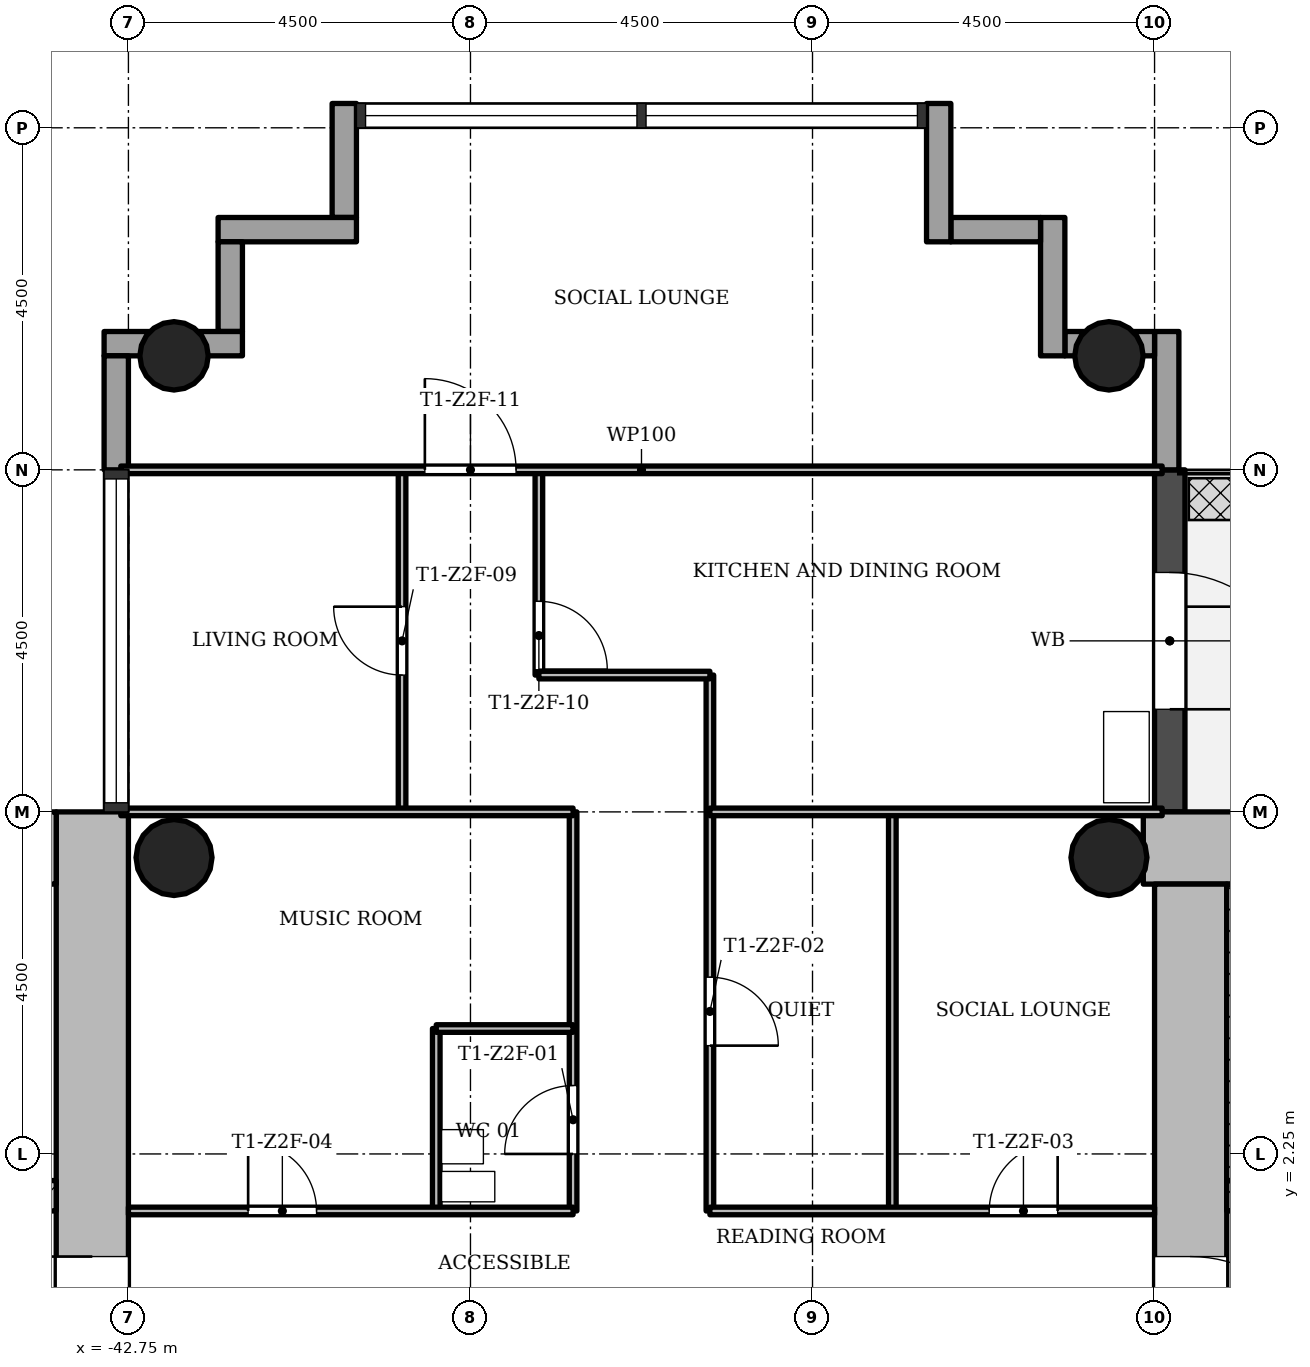
"""IFC4 building model, lengths in metres.
Left out: names, types, materials, properties, quantities, classifications, styles, units other than length and angle.
Written with IfcOpenShell. Run it as: python <this file> out.ifc"""

import sys

from ifc_helpers import new_model, si_unit, direction, frame, frame_2d, origin, origin_2d, place, context, subcontext, project, spatial, rectangle, hollow_circle, extrude, element, fill, save


model = new_model("IFC4")
c1 = context("Model", 3, precision=1e-05, world=origin(), true_north=direction((0.0, 1.0)))
c2 = subcontext(c1, "Body", "Model", "MODEL_VIEW")
j1 = project(units=[si_unit("LENGTHUNIT", "METRE"), si_unit("PLANEANGLEUNIT", "RADIAN")], contexts=[c1])
p1 = place(None, origin())
s1 = spatial("IfcSite", under=j1, at=p1, CompositionType="ELEMENT")
p2 = place(p1, origin())
s2 = spatial("IfcBuilding", under=s1, at=p2, CompositionType="ELEMENT")
p3 = place(p2, frame((0.0, 0.0, 110.6)))
s3 = spatial("IfcBuildingStorey", under=s2, at=p3, CompositionType="ELEMENT", Elevation=110.6)
p4 = place(p3, frame((-20.702, 6.275, 0.0), z_axis=(0.0, 0.0, 1.0), x_axis=(-1.0, 0.0, 0.0)))
e1 = element("IfcWall", 1, at=p4, inside=s3, PredefinedType="SHEAR", context=c2, shape_type="SweptSolid", body=[
    extrude(rectangle(XDim=8.696, YDim=0.95, at=frame_2d((4.348, 0.0))), origin(), (0.0, 0.0, 1.0), 3.4),
])
p5 = place(p3, frame((-28.775, 5.8, 0.0), z_axis=(0.0, 0.0, 1.0), x_axis=(0.0, -1.0, 0.0)))
e2 = element("IfcWall", 2, at=p5, inside=s3, PredefinedType="SHEAR", context=c2, shape_type="SweptSolid", body=[
    extrude(rectangle(XDim=12.55, YDim=0.95, at=frame_2d((6.275, 0.0))), origin(), (0.0, 0.0, 1.0), 3.4),
])
p6 = place(p5, frame((4.9, 0.0, 0.0)))
e3 = element("IfcOpeningElement", 3, at=p6, cuts=e2, PredefinedType="OPENING", context=c2, shape_type="SweptSolid", body=[
    extrude(rectangle(XDim=1.8, YDim=2.1, at=frame_2d((0.9, 1.05))), frame((0.0, 0.485, 0.0), z_axis=(0.0, -1.0, 0.0), x_axis=(1.0, 0.0, 0.0)), (0.0, 0.0, 1.0), 0.97),
])
p7 = place(p3, frame((-28.3, 1.7, 0.0), z_axis=(0.0, 0.0, 1.0), x_axis=(1.0, 0.0, 0.0)))
e4 = element("IfcWall", 4, at=p7, inside=s3, PredefinedType="SHEAR", context=c2, shape_type="SweptSolid", body=[
    extrude(rectangle(XDim=7.1, YDim=0.4, at=frame_2d((3.55, 0.0))), origin(), (0.0, 0.0, 1.0), 3.4),
])
p8 = place(p7, frame((0.7, 0.0, 0.0)))
e5 = element("IfcOpeningElement", 5, at=p8, cuts=e4, PredefinedType="OPENING", context=c2, shape_type="SweptSolid", body=[
    extrude(rectangle(XDim=0.9, YDim=2.1, at=frame_2d((0.45, 1.05))), frame((0.0, 0.21, 0.0), z_axis=(0.0, -1.0, 0.0), x_axis=(1.0, 0.0, 0.0)), (0.0, 0.0, 1.0), 0.42),
])
p9 = place(p3, frame((-43.225, -5.8, 0.0), z_axis=(0.0, 0.0, 1.0), x_axis=(0.0, 1.0, 0.0)))
e6 = element("IfcWall", 6, at=p9, inside=s3, PredefinedType="SHEAR", context=c2, shape_type="SweptSolid", body=[
    extrude(rectangle(XDim=12.55, YDim=0.95, at=frame_2d((6.275, 0.0))), origin(), (0.0, 0.0, 1.0), 3.4),
])
p10 = place(p9, frame((4.9, 0.0, 0.0)))
e7 = element("IfcOpeningElement", 7, at=p10, cuts=e6, PredefinedType="OPENING", context=c2, shape_type="SweptSolid", body=[
    extrude(rectangle(XDim=1.8, YDim=2.1, at=frame_2d((0.9, 1.05))), frame((0.0, 0.485, 0.0), z_axis=(0.0, -1.0, 0.0), x_axis=(1.0, 0.0, 0.0)), (0.0, 0.0, 1.0), 0.97),
])
p11 = place(p3, frame((-43.7, 6.275, 0.0), z_axis=(0.0, 0.0, 1.0), x_axis=(-1.0, 0.0, 0.0)))
e8 = element("IfcWall", 8, at=p11, inside=s3, PredefinedType="SHEAR", context=c2, shape_type="SweptSolid", body=[
    extrude(rectangle(XDim=8.05, YDim=0.95, at=frame_2d((4.025, 0.0))), origin(), (0.0, 0.0, 1.0), 3.4),
])
p12 = place(p3, frame((-50.8, 1.7, 0.0), z_axis=(0.0, 0.0, 1.0), x_axis=(1.0, 0.0, 0.0)))
e9 = element("IfcWall", 9, at=p12, inside=s3, PredefinedType="SHEAR", context=c2, shape_type="SweptSolid", body=[
    extrude(rectangle(XDim=7.1, YDim=0.4, at=frame_2d((3.55, 0.0))), origin(), (0.0, 0.0, 1.0), 3.4),
])
p13 = place(p12, frame((5.2, 0.0, 0.0)))
e10 = element("IfcOpeningElement", 10, at=p13, cuts=e9, PredefinedType="OPENING", context=c2, shape_type="SweptSolid", body=[
    extrude(rectangle(XDim=1.1, YDim=2.1, at=frame_2d((0.55, 1.05))), frame((0.0, 0.21, 0.0), z_axis=(0.0, -1.0, 0.0), x_axis=(1.0, 0.0, 0.0)), (0.0, 0.0, 1.0), 0.42),
])
for number, where, z_axis, x_axis in (
    (11, (-29.85, 12.75, 0.0), (0.0, 0.0, 1.0), (1.0, 0.0, 0.0)),
    (12, (-42.15, 12.75, 0.0), (0.0, 0.0, 1.0), (1.0, 0.0, 0.0)),
):
    element("IfcColumn", number, at=place(p3, frame(where, z_axis=z_axis, x_axis=x_axis)), inside=s3, PredefinedType="COLUMN", context=c2, shape_type="SweptSolid", body=[
        extrude(hollow_circle(Radius=0.45, WallThickness=0.032, at=origin_2d()), origin(), (0.0, 0.0, 1.0), 3.4),
    ])
for number, where, z_axis, x_axis in (
    (13, (-29.85, 6.15, 0.0), (0.0, 0.0, 1.0), (1.0, 0.0, 0.0)),
    (14, (-42.15, 6.15, 0.0), (0.0, 0.0, 1.0), (1.0, 0.0, 0.0)),
):
    element("IfcColumn", number, at=place(p3, frame(where, z_axis=z_axis, x_axis=x_axis)), inside=s3, PredefinedType="COLUMN", context=c2, shape_type="SweptSolid", body=[
        extrude(hollow_circle(Radius=0.5, WallThickness=0.036, at=origin_2d()), origin(), (0.0, 0.0, 1.0), 3.4),
    ])
p14 = place(p3, frame((-29.05, 6.75, -0.02), z_axis=(0.0, 0.0, 1.0), x_axis=(0.0, 1.0, 0.0)))
e15 = element("IfcWall", 15, at=p14, inside=s3, PredefinedType="STANDARD", context=c2, shape_type="SweptSolid", body=[
    extrude(rectangle(XDim=4.5, YDim=0.4, at=frame_2d((2.25, 0.0))), origin(), (0.0, 0.0, 1.0), 3.12),
])
p15 = place(p14, frame((1.35, 0.0, 0.02)))
e16 = element("IfcOpeningElement", 16, at=p15, cuts=e15, PredefinedType="OPENING", context=c2, shape_type="SweptSolid", body=[
    extrude(rectangle(XDim=1.8, YDim=2.1, at=frame_2d((0.9, 1.05))), frame((0.0, 0.21, 0.0), z_axis=(0.0, -1.0, 0.0), x_axis=(1.0, 0.0, 0.0)), (0.0, 0.0, 1.0), 0.42),
])
p16 = place(p3, frame((-29.09, 11.25, -0.3), z_axis=(0.0, 0.0, 1.0), x_axis=(0.0, 1.0, 0.0)))
e17 = element("IfcWall", 17, at=p16, inside=s3, PredefinedType="STANDARD", context=c2, shape_type="SweptSolid", body=[
    extrude(rectangle(XDim=1.82, YDim=0.32, at=frame_2d((0.91, 0.0))), origin(), (0.0, 0.0, 1.0), 3.4),
])
p17 = place(p3, frame((-29.25, 12.91, -0.3), z_axis=(0.0, 0.0, 1.0), x_axis=(-1.0, 0.0, 0.0)))
e18 = element("IfcWall", 18, at=p17, inside=s3, PredefinedType="STANDARD", context=c2, shape_type="SweptSolid", body=[
    extrude(rectangle(XDim=1.18, YDim=0.32, at=frame_2d((0.59, 0.0))), origin(), (0.0, 0.0, 1.0), 3.4),
])
p18 = place(p3, frame((-30.59, 12.75, -0.3), z_axis=(0.0, 0.0, 1.0), x_axis=(0.0, 1.0, 0.0)))
e19 = element("IfcWall", 19, at=p18, inside=s3, PredefinedType="STANDARD", context=c2, shape_type="SweptSolid", body=[
    extrude(rectangle(XDim=1.82, YDim=0.32, at=frame_2d((0.91, 0.0))), origin(), (0.0, 0.0, 1.0), 3.4),
])
p19 = place(p3, frame((-30.75, 14.41, -0.3), z_axis=(0.0, 0.0, 1.0), x_axis=(-1.0, 0.0, 0.0)))
e20 = element("IfcWall", 20, at=p19, inside=s3, PredefinedType="STANDARD", context=c2, shape_type="SweptSolid", body=[
    extrude(rectangle(XDim=1.18, YDim=0.32, at=frame_2d((0.59, 0.0))), origin(), (0.0, 0.0, 1.0), 3.4),
])
p20 = place(p3, frame((-32.09, 14.25, -0.3), z_axis=(0.0, 0.0, 1.0), x_axis=(0.0, 1.0, 0.0)))
e21 = element("IfcWall", 21, at=p20, inside=s3, PredefinedType="STANDARD", context=c2, shape_type="SweptSolid", body=[
    extrude(rectangle(XDim=1.82, YDim=0.32, at=frame_2d((0.91, 0.0))), origin(), (0.0, 0.0, 1.0), 3.4),
])
p21 = place(p3, frame((-39.91, 16.07, -0.3), z_axis=(0.0, 0.0, 1.0), x_axis=(0.0, -1.0, 0.0)))
e22 = element("IfcWall", 22, at=p21, inside=s3, PredefinedType="STANDARD", context=c2, shape_type="SweptSolid", body=[
    extrude(rectangle(XDim=1.5, YDim=0.32, at=frame_2d((0.75, 0.0))), origin(), (0.0, 0.0, 1.0), 3.4),
])
p22 = place(p3, frame((-39.75, 14.41, -0.3), z_axis=(0.0, 0.0, 1.0), x_axis=(-1.0, 0.0, 0.0)))
e23 = element("IfcWall", 23, at=p22, inside=s3, PredefinedType="STANDARD", context=c2, shape_type="SweptSolid", body=[
    extrude(rectangle(XDim=1.82, YDim=0.32, at=frame_2d((0.91, 0.0))), origin(), (0.0, 0.0, 1.0), 3.4),
])
p23 = place(p3, frame((-41.41, 14.25, -0.3), z_axis=(0.0, 0.0, 1.0), x_axis=(0.0, -1.0, 0.0)))
e24 = element("IfcWall", 24, at=p23, inside=s3, PredefinedType="STANDARD", context=c2, shape_type="SweptSolid", body=[
    extrude(rectangle(XDim=1.18, YDim=0.32, at=frame_2d((0.59, 0.0))), origin(), (0.0, 0.0, 1.0), 3.4),
])
p24 = place(p3, frame((-41.25, 12.91, -0.3), z_axis=(0.0, 0.0, 1.0), x_axis=(-1.0, 0.0, 0.0)))
e25 = element("IfcWall", 25, at=p24, inside=s3, PredefinedType="STANDARD", context=c2, shape_type="SweptSolid", body=[
    extrude(rectangle(XDim=1.82, YDim=0.32, at=frame_2d((0.91, 0.0))), origin(), (0.0, 0.0, 1.0), 3.4),
])
p25 = place(p3, frame((-42.91, 12.75, -0.3), z_axis=(0.0, 0.0, 1.0), x_axis=(0.0, -1.0, 0.0)))
e26 = element("IfcWall", 26, at=p25, inside=s3, PredefinedType="STANDARD", context=c2, shape_type="SweptSolid", body=[
    extrude(rectangle(XDim=1.5, YDim=0.32, at=frame_2d((0.75, 0.0))), origin(), (0.0, 0.0, 1.0), 3.4),
])
p26 = place(p3, frame((-39.15, 6.75, 0.0), z_axis=(0.0, 0.0, 1.0), x_axis=(0.0, 1.0, 0.0)))
e27 = element("IfcWall", 27, at=p26, inside=s3, PredefinedType="PARTITIONING", context=c2, shape_type="SweptSolid", body=[
    extrude(rectangle(XDim=4.5, YDim=0.1, at=frame_2d((2.25, 0.0))), origin(), (0.0, 0.0, 1.0), 3.0),
])
p27 = place(p26, frame((1.8, 0.0, 0.0)))
e28 = element("IfcOpeningElement", 28, at=p27, cuts=e27, PredefinedType="OPENING", context=c2, shape_type="SweptSolid", body=[
    extrude(rectangle(XDim=0.9, YDim=2.1, at=frame_2d((0.45, 1.05))), frame((0.0, 0.06, 0.0), z_axis=(0.0, -1.0, 0.0), x_axis=(1.0, 0.0, 0.0)), (0.0, 0.0, 1.0), 0.12),
])
p28 = place(p3, frame((-38.7, 1.5, 0.0), z_axis=(0.0, 0.0, 1.0), x_axis=(0.0, 1.0, 0.0)))
e29 = element("IfcWall", 29, at=p28, inside=s3, PredefinedType="PARTITIONING", context=c2, shape_type="SweptSolid", body=[
    extrude(rectangle(XDim=2.4, YDim=0.1, at=frame_2d((1.2, 0.0))), origin(), (0.0, 0.0, 1.0), 3.0),
])
p29 = place(p3, frame((-37.35, 8.55, 0.0), z_axis=(0.0, 0.0, 1.0), x_axis=(0.0, 1.0, 0.0)))
e30 = element("IfcWall", 30, at=p29, inside=s3, PredefinedType="PARTITIONING", context=c2, shape_type="SweptSolid", body=[
    extrude(rectangle(XDim=2.7, YDim=0.1, at=frame_2d((1.35, 0.0))), origin(), (0.0, 0.0, 1.0), 3.0),
])
p30 = place(p29, frame((0.07, 0.0, 0.0)))
e31 = element("IfcOpeningElement", 31, at=p30, cuts=e30, PredefinedType="OPENING", context=c2, shape_type="SweptSolid", body=[
    extrude(rectangle(XDim=0.9, YDim=2.1, at=frame_2d((0.45, 1.05))), frame((0.0, 0.06, 0.0), z_axis=(0.0, -1.0, 0.0), x_axis=(1.0, 0.0, 0.0)), (0.0, 0.0, 1.0), 0.12),
])
p31 = place(p3, frame((-36.9, 1.5, 0.0), z_axis=(0.0, 0.0, 1.0), x_axis=(0.0, 1.0, 0.0)))
e32 = element("IfcWall", 32, at=p31, inside=s3, PredefinedType="PARTITIONING", context=c2, shape_type="SweptSolid", body=[
    extrude(rectangle(XDim=5.25, YDim=0.1, at=frame_2d((2.625, 0.0))), origin(), (0.0, 0.0, 1.0), 3.0),
])
p32 = place(p31, frame((0.75, 0.0, 0.0)))
e33 = element("IfcOpeningElement", 33, at=p32, cuts=e32, PredefinedType="OPENING", context=c2, shape_type="SweptSolid", body=[
    extrude(rectangle(XDim=0.9, YDim=2.1, at=frame_2d((0.45, 1.05))), frame((0.0, 0.06, 0.0), z_axis=(0.0, -1.0, 0.0), x_axis=(1.0, 0.0, 0.0)), (0.0, 0.0, 1.0), 0.12),
])
p33 = place(p3, frame((-35.1, 1.5, 0.0), z_axis=(0.0, 0.0, 1.0), x_axis=(0.0, 1.0, 0.0)))
e34 = element("IfcWall", 34, at=p33, inside=s3, PredefinedType="PARTITIONING", context=c2, shape_type="SweptSolid", body=[
    extrude(rectangle(XDim=7.05, YDim=0.1, at=frame_2d((3.525, 0.0))), origin(), (0.0, 0.0, 1.0), 3.0),
])
p34 = place(p33, frame((2.175, 0.0, 0.0)))
e35 = element("IfcOpeningElement", 35, at=p34, cuts=e34, PredefinedType="OPENING", context=c2, shape_type="SweptSolid", body=[
    extrude(rectangle(XDim=0.9, YDim=2.1, at=frame_2d((0.45, 1.05))), frame((0.0, 0.06, 0.0), z_axis=(0.0, -1.0, 0.0), x_axis=(1.0, 0.0, 0.0)), (0.0, 0.0, 1.0), 0.12),
])
p35 = place(p3, frame((-32.7, 1.5, 0.0), z_axis=(0.0, 0.0, 1.0), x_axis=(0.0, 1.0, 0.0)))
e36 = element("IfcWall", 36, at=p35, inside=s3, PredefinedType="PARTITIONING", context=c2, shape_type="SweptSolid", body=[
    extrude(rectangle(XDim=5.25, YDim=0.1, at=frame_2d((2.625, 0.0))), origin(), (0.0, 0.0, 1.0), 3.0),
])
p36 = place(p3, frame((-42.75, 1.5, 0.0), z_axis=(0.0, 0.0, 1.0), x_axis=(1.0, 0.0, 0.0)))
e37 = element("IfcWall", 37, at=p36, inside=s3, PredefinedType="PARTITIONING", context=c2, shape_type="SweptSolid", body=[
    extrude(rectangle(XDim=5.85, YDim=0.1, at=frame_2d((2.925, 0.0))), origin(), (0.0, 0.0, 1.0), 3.0),
])
p37 = place(p36, frame((1.575, 0.0, 0.0)))
e38 = element("IfcOpeningElement", 38, at=p37, cuts=e37, PredefinedType="OPENING", context=c2, shape_type="SweptSolid", body=[
    extrude(rectangle(XDim=0.9, YDim=2.1, at=frame_2d((0.45, 1.05))), frame((0.0, 0.06, 0.0), z_axis=(0.0, -1.0, 0.0), x_axis=(1.0, 0.0, 0.0)), (0.0, 0.0, 1.0), 0.12),
])
p38 = place(p3, frame((-35.1, 1.5, 0.0), z_axis=(0.0, 0.0, 1.0), x_axis=(1.0, 0.0, 0.0)))
e39 = element("IfcWall", 39, at=p38, inside=s3, PredefinedType="PARTITIONING", context=c2, shape_type="SweptSolid", body=[
    extrude(rectangle(XDim=5.85, YDim=0.1, at=frame_2d((2.925, 0.0))), origin(), (0.0, 0.0, 1.0), 3.0),
])
p39 = place(p38, frame((3.675, 0.0, 0.0)))
e40 = element("IfcOpeningElement", 40, at=p39, cuts=e39, PredefinedType="OPENING", context=c2, shape_type="SweptSolid", body=[
    extrude(rectangle(XDim=0.9, YDim=2.1, at=frame_2d((0.45, 1.05))), frame((0.0, 0.06, 0.0), z_axis=(0.0, -1.0, 0.0), x_axis=(1.0, 0.0, 0.0)), (0.0, 0.0, 1.0), 0.12),
])
p40 = place(p3, frame((-38.7, 3.9, 0.0), z_axis=(0.0, 0.0, 1.0), x_axis=(1.0, 0.0, 0.0)))
e41 = element("IfcWall", 41, at=p40, inside=s3, PredefinedType="PARTITIONING", context=c2, shape_type="SweptSolid", body=[
    extrude(rectangle(XDim=1.8, YDim=0.1, at=frame_2d((0.9, 0.0))), origin(), (0.0, 0.0, 1.0), 3.0),
])
for number, where, z_axis, x_axis in (
    (42, (-42.85, 6.75, 0.0), (0.0, 0.0, 1.0), (1.0, 0.0, 0.0)),
    (43, (-35.1, 6.75, 0.0), (0.0, 0.0, 1.0), (1.0, 0.0, 0.0)),
):
    element("IfcWall", number, at=place(p3, frame(where, z_axis=z_axis, x_axis=x_axis)), inside=s3, PredefinedType="PARTITIONING", context=c2, shape_type="SweptSolid", body=[
        extrude(rectangle(XDim=5.95, YDim=0.1, at=frame_2d((2.975, 0.0))), origin(), (0.0, 0.0, 1.0), 3.0),
    ])
p41 = place(p3, frame((-37.35, 8.55, 0.0), z_axis=(0.0, 0.0, 1.0), x_axis=(1.0, 0.0, 0.0)))
e44 = element("IfcWall", 44, at=p41, inside=s3, PredefinedType="PARTITIONING", context=c2, shape_type="SweptSolid", body=[
    extrude(rectangle(XDim=2.25, YDim=0.1, at=frame_2d((1.125, 0.0))), origin(), (0.0, 0.0, 1.0), 3.0),
])
p42 = place(p3, frame((-42.85, 11.25, 0.0), z_axis=(0.0, 0.0, 1.0), x_axis=(1.0, 0.0, 0.0)))
e45 = element("IfcWall", 45, at=p42, inside=s3, PredefinedType="PARTITIONING", context=c2, shape_type="SweptSolid", body=[
    extrude(rectangle(XDim=13.7, YDim=0.1, at=frame_2d((6.85, 0.0))), origin(), (0.0, 0.0, 1.0), 3.0),
])
p43 = place(p42, frame((4.0, 0.0, 0.0)))
e46 = element("IfcOpeningElement", 46, at=p43, cuts=e45, PredefinedType="OPENING", context=c2, shape_type="SweptSolid", body=[
    extrude(rectangle(XDim=1.2, YDim=2.1, at=frame_2d((0.6, 1.05))), frame((0.0, 0.06, 0.0), z_axis=(0.0, -1.0, 0.0), x_axis=(1.0, 0.0, 0.0)), (0.0, 0.0, 1.0), 0.12),
])
p44 = place(p3, frame((-28.175, 1.9, 0.0), z_axis=(0.0, 0.0, 1.0), x_axis=(0.0, 1.0, 0.0)))
e47 = element("IfcWall", 47, at=p44, inside=s3, PredefinedType="SHEAR", context=c2, shape_type="SweptSolid", body=[
    extrude(rectangle(XDim=3.9, YDim=0.25, at=frame_2d((1.95, 0.0))), origin(), (0.0, 0.0, 1.0), 3.4),
])
p45 = place(p15, origin())
e48 = element("IfcDoor", 48, at=p45, inside=s3, OperationType="SINGLE_SWING_LEFT", PredefinedType="DOOR", context=c2, shape_type="SweptSolid", body=[
    extrude(rectangle(XDim=1.8, YDim=2.1, at=frame_2d((0.9, 1.05))), frame((0.0, 0.025, 0.0), z_axis=(0.0, -1.0, 0.0), x_axis=(1.0, 0.0, 0.0)), (0.0, 0.0, 1.0), 0.05),
])
fill(e16, e48)
p46 = place(p32, origin())
e49 = element("IfcDoor", 49, at=p46, inside=s3, OperationType="SINGLE_SWING_RIGHT", PredefinedType="DOOR", context=c2, shape_type="SweptSolid", body=[
    extrude(rectangle(XDim=0.9, YDim=2.1, at=frame_2d((0.45, 1.05))), frame((0.0, 0.025, 0.0), z_axis=(0.0, -1.0, 0.0), x_axis=(1.0, 0.0, 0.0)), (0.0, 0.0, 1.0), 0.05),
])
fill(e33, e49)
p47 = place(p34, origin())
e50 = element("IfcDoor", 50, at=p47, inside=s3, OperationType="SINGLE_SWING_LEFT", PredefinedType="DOOR", context=c2, shape_type="SweptSolid", body=[
    extrude(rectangle(XDim=0.9, YDim=2.1, at=frame_2d((0.45, 1.05))), frame((0.0, 0.025, 0.0), z_axis=(0.0, -1.0, 0.0), x_axis=(1.0, 0.0, 0.0)), (0.0, 0.0, 1.0), 0.05),
])
fill(e35, e50)
p48 = place(p39, origin())
e51 = element("IfcDoor", 51, at=p48, inside=s3, OperationType="SINGLE_SWING_LEFT", PredefinedType="DOOR", context=c2, shape_type="SweptSolid", body=[
    extrude(rectangle(XDim=0.9, YDim=2.1, at=frame_2d((0.45, 1.05))), frame((0.0, 0.025, 0.0), z_axis=(0.0, -1.0, 0.0), x_axis=(1.0, 0.0, 0.0)), (0.0, 0.0, 1.0), 0.05),
])
fill(e40, e51)
p49 = place(p37, origin())
e52 = element("IfcDoor", 52, at=p49, inside=s3, OperationType="SINGLE_SWING_RIGHT", PredefinedType="DOOR", context=c2, shape_type="SweptSolid", body=[
    extrude(rectangle(XDim=0.9, YDim=2.1, at=frame_2d((0.45, 1.05))), frame((0.0, 0.025, 0.0), z_axis=(0.0, -1.0, 0.0), x_axis=(1.0, 0.0, 0.0)), (0.0, 0.0, 1.0), 0.05),
])
fill(e38, e52)
p50 = place(p27, origin())
e53 = element("IfcDoor", 53, at=p50, inside=s3, OperationType="SINGLE_SWING_LEFT", PredefinedType="DOOR", context=c2, shape_type="SweptSolid", body=[
    extrude(rectangle(XDim=0.9, YDim=2.1, at=frame_2d((0.45, 1.05))), frame((0.0, 0.025, 0.0), z_axis=(0.0, -1.0, 0.0), x_axis=(1.0, 0.0, 0.0)), (0.0, 0.0, 1.0), 0.05),
])
fill(e28, e53)
p51 = place(p30, origin())
e54 = element("IfcDoor", 54, at=p51, inside=s3, OperationType="SINGLE_SWING_LEFT", PredefinedType="DOOR", context=c2, shape_type="SweptSolid", body=[
    extrude(rectangle(XDim=0.9, YDim=2.1, at=frame_2d((0.45, 1.05))), frame((0.0, 0.025, 0.0), z_axis=(0.0, -1.0, 0.0), x_axis=(1.0, 0.0, 0.0)), (0.0, 0.0, 1.0), 0.05),
])
fill(e31, e54)
p52 = place(p43, origin())
e55 = element("IfcDoor", 55, at=p52, inside=s3, OperationType="SINGLE_SWING_RIGHT", PredefinedType="DOOR", context=c2, shape_type="SweptSolid", body=[
    extrude(rectangle(XDim=1.2, YDim=2.1, at=frame_2d((0.6, 1.05))), frame((0.0, 0.025, 0.0), z_axis=(0.0, -1.0, 0.0), x_axis=(1.0, 0.0, 0.0)), (0.0, 0.0, 1.0), 0.05),
])
fill(e46, e55)
p53 = place(p6, origin())
e56 = element("IfcDoor", 56, at=p53, inside=s3, OperationType="SINGLE_SWING_LEFT", PredefinedType="DOOR", context=c2, shape_type="SweptSolid", body=[
    extrude(rectangle(XDim=1.8, YDim=2.1, at=frame_2d((0.9, 1.05))), frame((0.0, 0.025, 0.0), z_axis=(0.0, -1.0, 0.0), x_axis=(1.0, 0.0, 0.0)), (0.0, 0.0, 1.0), 0.05),
])
fill(e3, e56)
p54 = place(p10, origin())
e57 = element("IfcDoor", 57, at=p54, inside=s3, OperationType="SINGLE_SWING_LEFT", PredefinedType="DOOR", context=c2, shape_type="SweptSolid", body=[
    extrude(rectangle(XDim=1.8, YDim=2.1, at=frame_2d((0.9, 1.05))), frame((0.0, 0.025, 0.0), z_axis=(0.0, -1.0, 0.0), x_axis=(1.0, 0.0, 0.0)), (0.0, 0.0, 1.0), 0.05),
])
fill(e7, e57)
save(model, sys.argv[1])
